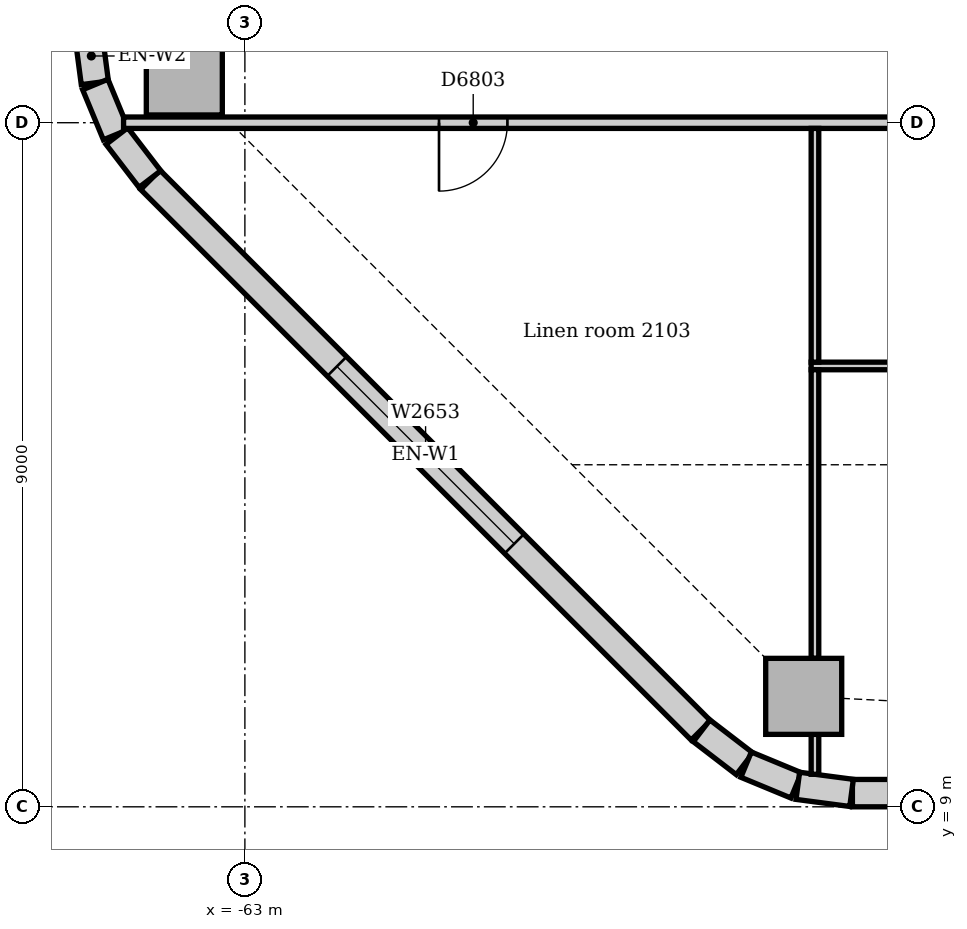
"""IFC4 building model, lengths in metres.
Left out: names, types, materials, properties, quantities, classifications, styles, units other than length and angle.
Written with IfcOpenShell. Run it as: python <this file> out.ifc"""

import sys

from ifc_helpers import new_model, si_unit, direction, frame, frame_2d, origin, origin_2d, place, context, subcontext, project, spatial, rectangle, extrude, element, fill, save


model = new_model("IFC4")
c1 = context("Model", 3, precision=1e-05, world=origin(), true_north=direction((0.0, 1.0)))
c2 = subcontext(c1, "Body", "Model", "MODEL_VIEW")
j1 = project(units=[si_unit("LENGTHUNIT", "METRE"), si_unit("PLANEANGLEUNIT", "RADIAN")], contexts=[c1])
p1 = place(None, origin())
s1 = spatial("IfcSite", under=j1, at=p1, CompositionType="ELEMENT")
p2 = place(p1, origin())
s2 = spatial("IfcBuilding", under=s1, at=p2, CompositionType="ELEMENT")
p3 = place(p2, frame((0.0, 0.0, 91.0)))
s3 = spatial("IfcBuildingStorey", under=s2, at=p3, CompositionType="ELEMENT", Elevation=91.0)
for number, where, z_axis, x_axis in (
    (1, (-55.648, 10.453, 0.0), (0.0, 0.0, 1.0), (1.0, 0.0, 0.0)),
    (2, (-63.797, 18.602, 0.0), (0.0, 0.0, 1.0), (1.0, 0.0, 0.0)),
):
    element("IfcColumn", number, at=place(p3, frame(where, z_axis=z_axis, x_axis=x_axis)), inside=s3, PredefinedType="COLUMN", context=c2, shape_type="SweptSolid", body=[
        extrude(rectangle(XDim=1.0, YDim=1.0, at=origin_2d()), origin(), (0.0, 0.0, 1.0), 3.7),
    ])
p4 = place(p3, frame((-55.007, 9.18, 0.0), z_axis=(0.0, 0.0, 1.0), x_axis=(1.0, 0.0, 0.0)))
e3 = element("IfcWall", 3, at=p4, inside=s3, PredefinedType="STANDARD", context=c2, shape_type="SweptSolid", body=[
    extrude(rectangle(XDim=23.765, YDim=0.36, at=frame_2d((11.882, 0.0))), origin(), (0.0, 0.0, 1.0), 3.7),
])
p5 = place(p4, frame((3.482, 0.0, 0.9)))
e4 = element("IfcOpeningElement", 4, at=p5, cuts=e3, PredefinedType="OPENING", context=c2, shape_type="SweptSolid", body=[
    extrude(rectangle(XDim=3.3, YDim=1.6, at=frame_2d((1.65, 0.8))), frame((0.0, 0.19, 0.0), z_axis=(0.0, -1.0, 0.0), x_axis=(1.0, 0.0, 0.0)), (0.0, 0.0, 1.0), 0.38),
])
p6 = place(p4, frame((7.982, 0.0, 0.9)))
e5 = element("IfcOpeningElement", 5, at=p6, cuts=e3, PredefinedType="OPENING", context=c2, shape_type="SweptSolid", body=[
    extrude(rectangle(XDim=3.3, YDim=1.6, at=frame_2d((1.65, 0.8))), frame((0.0, 0.19, 0.0), z_axis=(0.0, -1.0, 0.0), x_axis=(1.0, 0.0, 0.0)), (0.0, 0.0, 1.0), 0.38),
])
p7 = place(p4, frame((13.232, 0.0, 0.9)))
e6 = element("IfcOpeningElement", 6, at=p7, cuts=e3, PredefinedType="OPENING", context=c2, shape_type="SweptSolid", body=[
    extrude(rectangle(XDim=1.8, YDim=1.6, at=frame_2d((0.9, 0.8))), frame((0.0, 0.19, 0.0), z_axis=(0.0, -1.0, 0.0), x_axis=(1.0, 0.0, 0.0)), (0.0, 0.0, 1.0), 0.38),
])
p8 = place(p4, frame((16.982, 0.0, 0.9)))
e7 = element("IfcOpeningElement", 7, at=p8, cuts=e3, PredefinedType="OPENING", context=c2, shape_type="SweptSolid", body=[
    extrude(rectangle(XDim=3.3, YDim=1.6, at=frame_2d((1.65, 0.8))), frame((0.0, 0.19, 0.0), z_axis=(0.0, -1.0, 0.0), x_axis=(1.0, 0.0, 0.0)), (0.0, 0.0, 1.0), 0.38),
])
p9 = place(p3, frame((-64.244, 17.249, 0.0), z_axis=(0.0, 0.0, 1.0), x_axis=(0.707106781187, -0.707106781187, 0.0)))
e8 = element("IfcWall", 8, at=p9, inside=s3, PredefinedType="STANDARD", context=c2, shape_type="SweptSolid", body=[
    extrude(rectangle(XDim=10.243, YDim=0.36, at=frame_2d((5.121, 0.0))), origin(), (0.0, 0.0, 1.0), 3.7),
])
p10 = place(p9, frame((3.471, 0.0, 0.9)))
e9 = element("IfcOpeningElement", 9, at=p10, cuts=e8, PredefinedType="OPENING", context=c2, shape_type="SweptSolid", body=[
    extrude(rectangle(XDim=3.3, YDim=1.6, at=frame_2d((1.65, 0.8))), frame((0.0, 0.19, 0.0), z_axis=(0.0, -1.0, 0.0), x_axis=(1.0, 0.0, 0.0)), (0.0, 0.0, 1.0), 0.38),
])
for number, where, z_axis, x_axis in (
    (10, (-65.067, 19.231, 0.0), (0.0, 0.0, 1.0), (0.131, -0.991, 0.0)),
    (11, (-64.968, 18.503, 0.0), (0.0, 0.0, 1.0), (0.383, -0.924, 0.0)),
):
    element("IfcWall", number, at=place(p3, frame(where, z_axis=z_axis, x_axis=x_axis)), inside=s3, PredefinedType="STANDARD", context=c2, shape_type="SweptSolid", body=[
        extrude(rectangle(XDim=0.713, YDim=0.36, at=frame_2d((0.356, 0.0))), origin(), (0.0, 0.0, 1.0), 3.7),
    ])
for number, where, z_axis, x_axis in (
    (12, (-64.684, 17.825, 0.0), (0.0, 0.0, 1.0), (0.609, -0.793, 0.0)),
    (13, (-56.991, 10.0, 0.0), (0.0, 0.0, 1.0), (0.793, -0.609, 0.0)),
):
    element("IfcWall", number, at=place(p3, frame(where, z_axis=z_axis, x_axis=x_axis)), inside=s3, PredefinedType="STANDARD", context=c2, shape_type="SweptSolid", body=[
        extrude(rectangle(XDim=0.713, YDim=0.36, at=frame_2d((0.357, 0.0))), origin(), (0.0, 0.0, 1.0), 3.7),
    ])
for number, where, z_axis, x_axis in (
    (14, (-56.406, 9.555, 0.0), (0.0, 0.0, 1.0), (0.924, -0.383, 0.0)),
    (15, (-55.726, 9.276, 0.0), (0.0, 0.0, 1.0), (0.991, -0.131, 0.0)),
):
    element("IfcWall", number, at=place(p3, frame(where, z_axis=z_axis, x_axis=x_axis)), inside=s3, PredefinedType="STANDARD", context=c2, shape_type="SweptSolid", body=[
        extrude(rectangle(XDim=0.713, YDim=0.36, at=frame_2d((0.356, 0.0))), origin(), (0.0, 0.0, 1.0), 3.7),
    ])
p11 = place(p3, frame((-64.596, 18.0, 0.0), z_axis=(0.0, 0.0, 1.0), x_axis=(1.0, 0.0, 0.0)))
e16 = element("IfcWall", 16, at=p11, inside=s3, PredefinedType="PARTITIONING", context=c2, shape_type="SweptSolid", body=[
    extrude(rectangle(XDim=10.246, YDim=0.15, at=frame_2d((5.123, 0.0))), origin(), (0.0, 0.0, 1.0), 3.008),
])
p12 = place(p11, frame((4.15, 0.0, 0.0)))
e17 = element("IfcOpeningElement", 17, at=p12, cuts=e16, PredefinedType="OPENING", context=c2, shape_type="SweptSolid", body=[
    extrude(rectangle(XDim=0.9, YDim=2.1, at=frame_2d((0.45, 1.05))), frame((0.0, 0.085, 0.0), z_axis=(0.0, -1.0, 0.0), x_axis=(1.0, 0.0, 0.0)), (0.0, 0.0, 1.0), 0.17),
])
p13 = place(p3, frame((-55.55, 14.8, 0.0), z_axis=(0.0, 0.0, 1.0), x_axis=(1.0, 0.0, 0.0)))
e18 = element("IfcWall", 18, at=p13, inside=s3, PredefinedType="PARTITIONING", context=c2, shape_type="SweptSolid", body=[
    extrude(rectangle(XDim=13.475, YDim=0.1, at=frame_2d((6.737, 0.0))), origin(), (0.0, 0.0, 1.0), 3.7),
])
p14 = place(p13, frame((5.285, 0.0, 0.0)))
e19 = element("IfcOpeningElement", 19, at=p14, cuts=e18, PredefinedType="OPENING", context=c2, shape_type="SweptSolid", body=[
    extrude(rectangle(XDim=0.9, YDim=2.1, at=frame_2d((0.45, 1.05))), frame((0.0, 0.06, 0.0), z_axis=(0.0, -1.0, 0.0), x_axis=(1.0, 0.0, 0.0)), (0.0, 0.0, 1.0), 0.12),
])
p15 = place(p3, frame((-55.5, 14.85, 0.0), z_axis=(0.0, 0.0, 1.0), x_axis=(0.0, 1.0, 0.0)))
e20 = element("IfcWall", 20, at=p15, inside=s3, PredefinedType="PARTITIONING", context=c2, shape_type="SweptSolid", body=[
    extrude(rectangle(XDim=3.075, YDim=0.1, at=frame_2d((1.538, 0.0))), origin(), (0.0, 0.0, 1.0), 3.7),
])
p16 = place(p3, frame((-55.5, 10.953, 0.0), z_axis=(0.0, 0.0, 1.0), x_axis=(0.0, 1.0, 0.0)))
e21 = element("IfcWall", 21, at=p16, inside=s3, PredefinedType="PARTITIONING", context=c2, shape_type="SweptSolid", body=[
    extrude(rectangle(XDim=3.797, YDim=0.1, at=frame_2d((1.898, 0.0))), origin(), (0.0, 0.0, 1.0), 3.7),
])
p17 = place(p3, frame((-55.5, 9.428, 0.0), z_axis=(0.0, 0.0, 1.0), x_axis=(0.0, 1.0, 0.0)))
e22 = element("IfcWall", 22, at=p17, inside=s3, PredefinedType="PARTITIONING", context=c2, shape_type="SweptSolid", body=[
    extrude(rectangle(XDim=0.525, YDim=0.1, at=frame_2d((0.263, 0.0))), origin(), (0.0, 0.0, 1.0), 3.7),
])
p18 = place(p10, origin())
e23 = element("IfcWindow", 23, at=p18, inside=s3, PartitioningType="SINGLE_PANEL", PredefinedType="WINDOW", context=c2, shape_type="SweptSolid", body=[
    extrude(rectangle(XDim=3.3, YDim=1.6, at=frame_2d((1.65, 0.8))), frame((0.0, 0.13, 0.0), z_axis=(0.0, -1.0, 0.0), x_axis=(1.0, 0.0, 0.0)), (0.0, 0.0, 1.0), 0.06),
])
fill(e9, e23)
p19 = place(p12, frame((0.9, 0.0, 0.0), z_axis=(0.0, 0.0, 1.0), x_axis=(-1.0, 0.0, 0.0)))
e24 = element("IfcDoor", 24, at=p19, inside=s3, OperationType="SINGLE_SWING_RIGHT", PredefinedType="DOOR", context=c2, shape_type="SweptSolid", body=[
    extrude(rectangle(XDim=0.9, YDim=2.1, at=frame_2d((0.45, 1.05))), frame((0.0, 0.025, 0.0), z_axis=(0.0, -1.0, 0.0), x_axis=(1.0, 0.0, 0.0)), (0.0, 0.0, 1.0), 0.05),
])
fill(e17, e24)
save(model, sys.argv[1])
